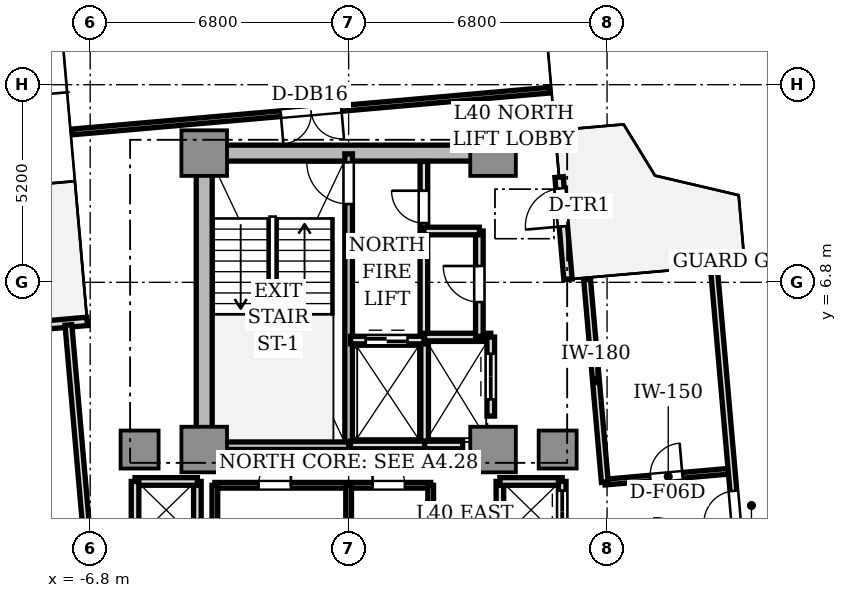
"""IFC4 building model, lengths in metres.
Left out: names, types, materials, properties, quantities, classifications, styles, units other than length and angle.
Written with IfcOpenShell. Run it as: python <this file> out.ifc"""

import sys

from ifc_helpers import new_model, si_unit, direction, frame, frame_2d, origin, origin_2d, place, context, subcontext, project, spatial, rectangle, extrude, source, transform, mapped, element, fill, save


model = new_model("IFC4")
c1 = context("Model", 3, precision=1e-05, world=origin(), true_north=direction((0.0, 1.0)))
c2 = subcontext(c1, "Body", "Model", "MODEL_VIEW")
j1 = project(units=[si_unit("LENGTHUNIT", "METRE"), si_unit("PLANEANGLEUNIT", "RADIAN")], contexts=[c1])
p1 = place(None, origin())
s1 = spatial("IfcSite", under=j1, at=p1, CompositionType="ELEMENT")
p2 = place(p1, origin())
s2 = spatial("IfcBuilding", under=s1, at=p2, CompositionType="ELEMENT")
p3 = place(p2, frame((0.0, 0.0, 147.25)))
s3 = spatial("IfcBuildingStorey", under=s2, at=p3, CompositionType="ELEMENT", Elevation=147.25)
p4 = place(p3, frame((-3.55, 10.2, 0.0), z_axis=(0.0, 0.0, 1.0), x_axis=(1.0, 0.0, 0.0)))
e1 = element("IfcWall", 1, at=p4, inside=s3, PredefinedType="SHEAR", context=c2, shape_type="SweptSolid", body=[
    extrude(rectangle(XDim=7.1, YDim=0.42, at=frame_2d((3.55, 0.0))), origin(), (0.0, 0.0, 1.0), 3.11),
])
p5 = place(p3, frame((-3.8, 2.85, 0.0), z_axis=(0.0, 0.0, 1.0), x_axis=(0.0, 1.0, 0.0)))
e2 = element("IfcWall", 2, at=p5, inside=s3, PredefinedType="SHEAR", context=c2, shape_type="SweptSolid", body=[
    extrude(rectangle(XDim=6.9, YDim=0.42, at=frame_2d((3.45, 0.0))), origin(), (0.0, 0.0, 1.0), 3.11),
])
m1 = source(origin(), c2, "Body", "SweptSolid", [
    extrude(rectangle(XDim=1.2, YDim=1.2, at=origin_2d()), origin(), (0.0, 0.0, 1.0), 3.11),
])
for number, where, z_axis, x_axis in (
    (3, (-3.8, 2.4, 0.0), (0.0, 0.0, 1.0), (1.0, 0.0, 0.0)),
    (4, (3.8, 2.4, 0.0), (0.0, 0.0, 1.0), (1.0, 0.0, 0.0)),
    (5, (-3.8, 10.2, 0.0), (0.0, 0.0, 1.0), (1.0, 0.0, 0.0)),
    (6, (3.8, 10.2, 0.0), (0.0, 0.0, 1.0), (1.0, 0.0, 0.0)),
):
    element("IfcColumn", number, at=place(p3, frame(where, z_axis=z_axis, x_axis=x_axis)), inside=s3, PredefinedType="COLUMN", context=c2, shape_type="MappedRepresentation", body=[
        mapped(m1, transform((0.0, 0.0, 0.0), scale=1.0)),
    ])
m2 = source(origin(), c2, "Body", "SweptSolid", [
    extrude(rectangle(XDim=1.0, YDim=1.0, at=origin_2d()), origin(), (0.0, 0.0, 1.0), 3.11),
])
for number, where, z_axis, x_axis in (
    (7, (5.5, 2.4, 0.0), (0.0, 0.0, 1.0), (1.0, 0.0, 0.0)),
    (8, (-5.5, 2.4, 0.0), (0.0, 0.0, 1.0), (1.0, 0.0, 0.0)),
):
    element("IfcColumn", number, at=place(p3, frame(where, z_axis=z_axis, x_axis=x_axis)), inside=s3, PredefinedType="COLUMN", context=c2, shape_type="MappedRepresentation", body=[
        mapped(m2, transform((0.0, 0.0, 0.0), scale=1.0)),
    ])
p6 = place(p3, frame((5.772, 6.879, 0.0), z_axis=(0.0, 0.0, 1.0), x_axis=(-0.087168071984, 0.996193619346, 0.0)))
e9 = element("IfcWall", 9, at=p6, inside=s3, PredefinedType="STANDARD", context=c2, shape_type="SweptSolid", body=[
    extrude(rectangle(XDim=2.7, YDim=0.22, at=frame_2d((1.35, 0.0))), origin(), (0.0, 0.0, 1.0), 3.11),
])
p7 = place(p6, frame((1.4, 0.0, 0.0)))
e10 = element("IfcOpeningElement", 10, at=p7, cuts=e9, PredefinedType="OPENING", context=c2, shape_type="SweptSolid", body=[
    extrude(rectangle(XDim=1.0, YDim=2.2, at=frame_2d((0.5, 1.1))), frame((0.0, 0.12, 0.0), z_axis=(0.0, -1.0, 0.0), x_axis=(1.0, 0.0, 0.0)), (0.0, 0.0, 1.0), 0.24),
])
p8 = place(p3, frame((-6.879, 5.772, 0.0), z_axis=(0.0, 0.0, 1.0), x_axis=(-0.996193619346, -0.087168071984, 0.0)))
e11 = element("IfcWall", 11, at=p8, inside=s3, PredefinedType="STANDARD", context=c2, shape_type="SweptSolid", body=[
    extrude(rectangle(XDim=2.7, YDim=0.22, at=frame_2d((1.35, 0.0))), origin(), (0.0, 0.0, 1.0), 3.11),
])
p9 = place(p8, frame((1.4, 0.0, 0.0)))
e12 = element("IfcOpeningElement", 12, at=p9, cuts=e11, PredefinedType="OPENING", context=c2, shape_type="SweptSolid", body=[
    extrude(rectangle(XDim=1.0, YDim=2.2, at=frame_2d((0.5, 1.1))), frame((0.0, 0.12, 0.0), z_axis=(0.0, -1.0, 0.0), x_axis=(1.0, 0.0, 0.0)), (0.0, 0.0, 1.0), 0.24),
])
p10 = place(p3, frame((0.0, 2.5, 0.0), z_axis=(0.0, 0.0, 1.0), x_axis=(0.0, 1.0, 0.0)))
e13 = element("IfcWall", 13, at=p10, inside=s3, PredefinedType="SOLIDWALL", context=c2, shape_type="SweptSolid", body=[
    extrude(rectangle(XDim=7.68, YDim=0.2, at=frame_2d((3.84, 0.0))), origin(), (0.0, 0.0, 1.0), 3.11),
])
p11 = place(p10, frame((6.36, 0.0, 0.0)))
e14 = element("IfcOpeningElement", 14, at=p11, cuts=e13, PredefinedType="OPENING", context=c2, shape_type="SweptSolid", body=[
    extrude(rectangle(XDim=1.1, YDim=2.15, at=frame_2d((0.55, 1.075))), frame((0.0, 0.11, 0.0), z_axis=(0.0, -1.0, 0.0), x_axis=(1.0, 0.0, 0.0)), (0.0, 0.0, 1.0), 0.22),
])
p12 = place(p3, frame((-3.72, 2.5, 0.0), z_axis=(0.0, 0.0, 1.0), x_axis=(1.0, 0.0, 0.0)))
e15 = element("IfcWall", 15, at=p12, inside=s3, PredefinedType="SOLIDWALL", context=c2, shape_type="SweptSolid", body=[
    extrude(rectangle(XDim=3.72, YDim=0.2, at=frame_2d((1.86, 0.0))), origin(), (0.0, 0.0, 1.0), 3.11),
])
p13 = place(p3, frame((1.98, 5.32, 0.0), z_axis=(0.0, 0.0, 1.0), x_axis=(0.0, 1.0, 0.0)))
e16 = element("IfcWall", 16, at=p13, inside=s3, PredefinedType="SOLIDWALL", context=c2, shape_type="SweptSolid", body=[
    extrude(rectangle(XDim=4.66, YDim=0.2, at=frame_2d((2.33, 0.0))), origin(), (0.0, 0.0, 1.0), 2.66),
])
p14 = place(p13, frame((3.04, 0.0, 0.0)))
e17 = element("IfcOpeningElement", 17, at=p14, cuts=e16, PredefinedType="OPENING", context=c2, shape_type="SweptSolid", body=[
    extrude(rectangle(XDim=0.85, YDim=2.1, at=frame_2d((0.425, 1.05))), frame((0.0, 0.11, 0.0), z_axis=(0.0, -1.0, 0.0), x_axis=(1.0, 0.0, 0.0)), (0.0, 0.0, 1.0), 0.22),
])
p15 = place(p3, frame((2.0, 2.5, 0.0), z_axis=(0.0, 0.0, 1.0), x_axis=(0.0, 1.0, 0.0)))
e18 = element("IfcWall", 18, at=p15, inside=s3, PredefinedType="SOLIDWALL", context=c2, shape_type="SweptSolid", body=[
    extrude(rectangle(XDim=2.78, YDim=0.2, at=frame_2d((1.39, 0.0))), origin(), (0.0, 0.0, 1.0), 2.66),
])
p16 = place(p3, frame((0.05, 2.52, 0.0), z_axis=(0.0, 0.0, 1.0), x_axis=(1.0, 0.0, 0.0)))
e19 = element("IfcWall", 19, at=p16, inside=s3, PredefinedType="SOLIDWALL", context=c2, shape_type="SweptSolid", body=[
    extrude(rectangle(XDim=1.95, YDim=0.2, at=frame_2d((0.975, 0.0))), origin(), (0.0, 0.0, 1.0), 2.66),
])
p17 = place(p3, frame((0.05, 5.28, 0.0), z_axis=(0.0, 0.0, 1.0), x_axis=(1.0, 0.0, 0.0)))
e20 = element("IfcWall", 20, at=p17, inside=s3, PredefinedType="SOLIDWALL", context=c2, shape_type="SweptSolid", body=[
    extrude(rectangle(XDim=1.93, YDim=0.2, at=frame_2d((0.965, 0.0))), origin(), (0.0, 0.0, 1.0), 2.66),
])
p18 = place(p17, frame((0.4, 0.0, 0.0)))
e21 = element("IfcOpeningElement", 21, at=p18, cuts=e20, PredefinedType="OPENING", context=c2, shape_type="SweptSolid", body=[
    extrude(rectangle(XDim=1.1, YDim=2.2, at=frame_2d((0.55, 1.1))), frame((0.0, 0.11, 0.0), z_axis=(0.0, -1.0, 0.0), x_axis=(1.0, 0.0, 0.0)), (0.0, 0.0, 1.0), 0.22),
])
p19 = place(p3, frame((2.0, 2.52, 0.0), z_axis=(0.0, 0.0, 1.0), x_axis=(1.0, 0.0, 0.0)))
e22 = element("IfcWall", 22, at=p19, inside=s3, PredefinedType="SOLIDWALL", context=c2, shape_type="SweptSolid", body=[
    extrude(rectangle(XDim=1.0, YDim=0.2, at=frame_2d((0.5, 0.0))), origin(), (0.0, 0.0, 1.0), 2.66),
])
p20 = place(p3, frame((2.0, 5.36, 0.0), z_axis=(0.0, 0.0, 1.0), x_axis=(1.0, 0.0, 0.0)))
e23 = element("IfcWall", 23, at=p20, inside=s3, PredefinedType="SOLIDWALL", context=c2, shape_type="SweptSolid", body=[
    extrude(rectangle(XDim=1.74, YDim=0.2, at=frame_2d((0.87, 0.0))), origin(), (0.0, 0.0, 1.0), 2.66),
])
p21 = place(p3, frame((3.74, 3.28, 0.0), z_axis=(0.0, 0.0, 1.0), x_axis=(0.0, 1.0, 0.0)))
e24 = element("IfcWall", 24, at=p21, inside=s3, PredefinedType="SOLIDWALL", context=c2, shape_type="SweptSolid", body=[
    extrude(rectangle(XDim=2.08, YDim=0.2, at=frame_2d((1.04, 0.0))), origin(), (0.0, 0.0, 1.0), 2.66),
])
p22 = place(p21, frame((0.44, 0.0, 0.0)))
e25 = element("IfcOpeningElement", 25, at=p22, cuts=e24, PredefinedType="OPENING", context=c2, shape_type="SweptSolid", body=[
    extrude(rectangle(XDim=1.2, YDim=2.2, at=frame_2d((0.6, 1.1))), frame((0.0, 0.11, 0.0), z_axis=(0.0, -1.0, 0.0), x_axis=(1.0, 0.0, 0.0)), (0.0, 0.0, 1.0), 0.22),
])
p23 = place(p3, frame((3.98, -1.56, 0.0), z_axis=(0.0, 0.0, 1.0), x_axis=(0.0, 1.0, 0.0)))
e26 = element("IfcWall", 26, at=p23, inside=s3, PredefinedType="SOLIDWALL", context=c2, shape_type="SweptSolid", body=[
    extrude(rectangle(XDim=3.12, YDim=0.2, at=frame_2d((1.56, 0.0))), origin(), (0.0, 0.0, 1.0), 2.28),
])
p24 = place(p3, frame((3.98, 1.56, 0.0), z_axis=(0.0, 0.0, 1.0), x_axis=(1.0, 0.0, 0.0)))
e27 = element("IfcWall", 27, at=p24, inside=s3, PredefinedType="SOLIDWALL", context=c2, shape_type="SweptSolid", body=[
    extrude(rectangle(XDim=1.64, YDim=0.2, at=frame_2d((0.82, 0.0))), origin(), (0.0, 0.0, 1.0), 2.66),
])
p25 = place(p3, frame((5.62, 0.0, 0.0), z_axis=(0.0, 0.0, 1.0), x_axis=(0.0, 1.0, 0.0)))
e28 = element("IfcWall", 28, at=p25, inside=s3, PredefinedType="SOLIDWALL", context=c2, shape_type="SweptSolid", body=[
    extrude(rectangle(XDim=1.56, YDim=0.2, at=frame_2d((0.78, 0.0))), origin(), (0.0, 0.0, 1.0), 2.66),
])
p26 = place(p25, frame((0.22, 0.0, 0.0)))
e29 = element("IfcOpeningElement", 29, at=p26, cuts=e28, PredefinedType="OPENING", context=c2, shape_type="SweptSolid", body=[
    extrude(rectangle(XDim=1.1, YDim=2.2, at=frame_2d((0.55, 1.1))), frame((0.0, 0.11, 0.0), z_axis=(0.0, -1.0, 0.0), x_axis=(1.0, 0.0, 0.0)), (0.0, 0.0, 1.0), 0.22),
])
p27 = place(p3, frame((-3.98, -1.56, 0.0), z_axis=(0.0, 0.0, 1.0), x_axis=(0.0, 1.0, 0.0)))
e30 = element("IfcWall", 30, at=p27, inside=s3, PredefinedType="SOLIDWALL", context=c2, shape_type="SweptSolid", body=[
    extrude(rectangle(XDim=3.12, YDim=0.2, at=frame_2d((1.56, 0.0))), origin(), (0.0, 0.0, 1.0), 2.28),
])
p28 = place(p3, frame((-5.62, 1.56, 0.0), z_axis=(0.0, 0.0, 1.0), x_axis=(1.0, 0.0, 0.0)))
e31 = element("IfcWall", 31, at=p28, inside=s3, PredefinedType="SOLIDWALL", context=c2, shape_type="SweptSolid", body=[
    extrude(rectangle(XDim=1.64, YDim=0.2, at=frame_2d((0.82, 0.0))), origin(), (0.0, 0.0, 1.0), 2.66),
])
p29 = place(p3, frame((-5.62, 0.0, 0.0), z_axis=(0.0, 0.0, 1.0), x_axis=(0.0, 1.0, 0.0)))
e32 = element("IfcWall", 32, at=p29, inside=s3, PredefinedType="SOLIDWALL", context=c2, shape_type="SweptSolid", body=[
    extrude(rectangle(XDim=1.56, YDim=0.2, at=frame_2d((0.78, 0.0))), origin(), (0.0, 0.0, 1.0), 2.66),
])
p30 = place(p3, frame((3.44, 5.38, 0.0), z_axis=(0.0, 0.0, 1.0), x_axis=(0.0, 1.0, 0.0)))
e33 = element("IfcWall", 33, at=p30, inside=s3, PredefinedType="SOLIDWALL", context=c2, shape_type="SweptSolid", body=[
    extrude(rectangle(XDim=2.77, YDim=0.2, at=frame_2d((1.385, 0.0))), origin(), (0.0, 0.0, 1.0), 2.66),
])
p31 = place(p30, frame((0.9, 0.0, 0.0)))
e34 = element("IfcOpeningElement", 34, at=p31, cuts=e33, PredefinedType="OPENING", context=c2, shape_type="SweptSolid", body=[
    extrude(rectangle(XDim=0.95, YDim=2.15, at=frame_2d((0.475, 1.075))), frame((0.0, 0.11, 0.0), z_axis=(0.0, -1.0, 0.0), x_axis=(1.0, 0.0, 0.0)), (0.0, 0.0, 1.0), 0.22),
])
p32 = place(p3, frame((1.98, 8.15, 0.0), z_axis=(0.0, 0.0, 1.0), x_axis=(1.0, 0.0, 0.0)))
e35 = element("IfcWall", 35, at=p32, inside=s3, PredefinedType="SOLIDWALL", context=c2, shape_type="SweptSolid", body=[
    extrude(rectangle(XDim=1.46, YDim=0.2, at=frame_2d((0.73, 0.0))), origin(), (0.0, 0.0, 1.0), 2.66),
])
p33 = place(p3, frame((-3.52, 1.46, 0.0), z_axis=(0.0, 0.0, 1.0), x_axis=(1.0, 0.0, 0.0)))
e36 = element("IfcWall", 36, at=p33, inside=s3, PredefinedType="PARTITIONING", context=c2, shape_type="SweptSolid", body=[
    extrude(rectangle(XDim=5.68, YDim=0.15, at=frame_2d((2.84, 0.0))), origin(), (0.0, 0.0, 1.0), 2.66),
])
p34 = place(p33, frame((1.15, 0.0, 0.0)))
e37 = element("IfcOpeningElement", 37, at=p34, cuts=e36, PredefinedType="OPENING", context=c2, shape_type="SweptSolid", body=[
    extrude(rectangle(XDim=0.85, YDim=2.1, at=frame_2d((0.425, 1.05))), frame((0.0, 0.085, 0.0), z_axis=(0.0, -1.0, 0.0), x_axis=(1.0, 0.0, 0.0)), (0.0, 0.0, 1.0), 0.17),
])
p35 = place(p33, frame((4.15, 0.0, 0.0)))
e38 = element("IfcOpeningElement", 38, at=p35, cuts=e36, PredefinedType="OPENING", context=c2, shape_type="SweptSolid", body=[
    extrude(rectangle(XDim=0.85, YDim=2.1, at=frame_2d((0.425, 1.05))), frame((0.0, 0.085, 0.0), z_axis=(0.0, -1.0, 0.0), x_axis=(1.0, 0.0, 0.0)), (0.0, 0.0, 1.0), 0.17),
])
p36 = place(p3, frame((-3.52, 0.1, 0.0), z_axis=(0.0, 0.0, 1.0), x_axis=(0.0, 1.0, 0.0)))
e39 = element("IfcWall", 39, at=p36, inside=s3, PredefinedType="PARTITIONING", context=c2, shape_type="SweptSolid", body=[
    extrude(rectangle(XDim=1.36, YDim=0.15, at=frame_2d((0.68, 0.0))), origin(), (0.0, 0.0, 1.0), 2.28),
])
for number, where, z_axis, x_axis in (
    (40, (2.16, 0.1, 0.0), (0.0, 0.0, 1.0), (0.0, 1.0, 0.0)),
    (41, (0.0, 0.1, 0.0), (0.0, 0.0, 1.0), (0.0, 1.0, 0.0)),
):
    element("IfcWall", number, at=place(p3, frame(where, z_axis=z_axis, x_axis=x_axis)), inside=s3, PredefinedType="PARTITIONING", context=c2, shape_type="SweptSolid", body=[
        extrude(rectangle(XDim=1.36, YDim=0.15, at=frame_2d((0.68, 0.0))), origin(), (0.0, 0.0, 1.0), 2.66),
    ])
p37 = place(p3, frame((6.741, 1.543, 0.0), z_axis=(0.0, 0.0, 1.0), x_axis=(0.996193954812, 0.087164238054, 0.0)))
e42 = element("IfcWall", 42, at=p37, inside=s3, PredefinedType="PARTITIONING", context=c2, shape_type="SweptSolid", body=[
    extrude(rectangle(XDim=3.35, YDim=0.15, at=frame_2d((1.675, 0.0))), origin(), (0.0, 0.0, 1.0), 2.66),
])
p38 = place(p37, frame((1.2, 0.0, 0.0)))
e43 = element("IfcOpeningElement", 43, at=p38, cuts=e42, PredefinedType="OPENING", context=c2, shape_type="SweptSolid", body=[
    extrude(rectangle(XDim=0.85, YDim=2.1, at=frame_2d((0.425, 1.05))), frame((0.0, 0.085, 0.0), z_axis=(0.0, -1.0, 0.0), x_axis=(1.0, 0.0, 0.0)), (0.0, 0.0, 1.0), 0.17),
])
p39 = place(p3, frame((6.741, 1.543, 0.0), z_axis=(0.0, 0.0, 1.0), x_axis=(-0.087161289348, 0.996194212812, 0.0)))
e44 = element("IfcWall", 44, at=p39, inside=s3, PredefinedType="PARTITIONING", context=c2, shape_type="SweptSolid", body=[
    extrude(rectangle(XDim=5.35, YDim=0.18, at=frame_2d((2.675, 0.0))), origin(), (0.0, 0.0, 1.0), 2.66),
])
p40 = place(p3, frame((10.71, -5.387, 0.0), z_axis=(0.0, 0.0, 1.0), x_axis=(-0.087154691724, 0.996194790044, 0.0)))
e45 = element("IfcWall", 45, at=p40, inside=s3, PredefinedType="PARTITIONING", context=c2, shape_type="SweptSolid", body=[
    extrude(rectangle(XDim=12.6, YDim=0.18, at=frame_2d((6.3, 0.0))), origin(), (0.0, 0.0, 1.0), 2.66),
])
p41 = place(p40, frame((5.875, 0.0, 0.0)))
e46 = element("IfcOpeningElement", 46, at=p41, cuts=e45, PredefinedType="OPENING", context=c2, shape_type="SweptSolid", body=[
    extrude(rectangle(XDim=0.85, YDim=2.1, at=frame_2d((0.425, 1.05))), frame((0.0, 0.1, 0.0), z_axis=(0.0, -1.0, 0.0), x_axis=(1.0, 0.0, 0.0)), (0.0, 0.0, 1.0), 0.2),
])
p42 = place(p3, frame((5.287, 11.856, 0.0), z_axis=(0.0, 0.0, 1.0), x_axis=(-0.996194790044, -0.087154691724, 0.0)))
e47 = element("IfcWall", 47, at=p42, inside=s3, PredefinedType="PARTITIONING", context=c2, shape_type="SweptSolid", body=[
    extrude(rectangle(XDim=12.6, YDim=0.15, at=frame_2d((6.3, 0.0))), origin(), (0.0, 0.0, 1.0), 2.66),
])
p43 = place(p42, frame((5.5, 0.0, 0.0)))
e48 = element("IfcOpeningElement", 48, at=p43, cuts=e47, PredefinedType="OPENING", context=c2, shape_type="SweptSolid", body=[
    extrude(rectangle(XDim=1.6, YDim=2.25, at=frame_2d((0.8, 1.125))), frame((0.0, 0.085, 0.0), z_axis=(0.0, -1.0, 0.0), x_axis=(1.0, 0.0, 0.0)), (0.0, 0.0, 1.0), 0.17),
])
p44 = place(p3, frame((-7.373, 5.679, 0.0), z_axis=(0.0, 0.0, 1.0), x_axis=(0.087163455754, -0.996194023261, 0.0)))
e49 = element("IfcWall", 49, at=p44, inside=s3, PredefinedType="PARTITIONING", context=c2, shape_type="SweptSolid", body=[
    extrude(rectangle(XDim=10.4, YDim=0.18, at=frame_2d((5.2, 0.0))), origin(), (0.0, 0.0, 1.0), 2.66),
])
m3 = source(origin(), c2, "Body", "SweptSolid", [
    extrude(rectangle(XDim=1.0, YDim=0.05, at=origin_2d()), origin(), (0.0, 0.0, 1.0), 2.2),
])
p45 = place(p7, frame((0.5, 0.0, 0.0)))
e50 = element("IfcDoor", 50, at=p45, inside=s3, OperationType="SINGLE_SWING_LEFT", PredefinedType="DOOR", context=c2, shape_type="MappedRepresentation", body=[
    mapped(m3, transform((0.0, 0.0, 0.0), scale=1.0)),
])
fill(e10, e50)
m4 = source(origin(), c2, "Body", "SweptSolid", [
    extrude(rectangle(XDim=1.1, YDim=0.05, at=origin_2d()), origin(), (0.0, 0.0, 1.0), 2.15),
])
p46 = place(p11, frame((0.55, 0.0, 0.0)))
e51 = element("IfcDoor", 51, at=p46, inside=s3, OperationType="SINGLE_SWING_RIGHT", PredefinedType="DOOR", context=c2, shape_type="MappedRepresentation", body=[
    mapped(m4, transform((0.0, 0.0, 0.0), scale=1.0)),
])
fill(e14, e51)
m5 = source(origin(), c2, "Body", "SweptSolid", [
    extrude(rectangle(XDim=0.85, YDim=0.05, at=origin_2d()), origin(), (0.0, 0.0, 1.0), 2.1),
])
p47 = place(p14, frame((0.425, 0.0, 0.0)))
e52 = element("IfcDoor", 52, at=p47, inside=s3, OperationType="SINGLE_SWING_RIGHT", PredefinedType="DOOR", context=c2, shape_type="MappedRepresentation", body=[
    mapped(m5, transform((0.0, 0.0, 0.0), scale=1.0)),
])
fill(e17, e52)
m6 = source(origin(), c2, "Body", "SweptSolid", [
    extrude(rectangle(XDim=1.1, YDim=0.05, at=origin_2d()), origin(), (0.0, 0.0, 1.0), 2.2),
])
p48 = place(p18, frame((0.55, 0.0, 0.0)))
e53 = element("IfcDoor", 53, at=p48, inside=s3, OperationType="DOUBLE_DOOR_SLIDING", PredefinedType="DOOR", context=c2, shape_type="MappedRepresentation", body=[
    mapped(m6, transform((0.0, 0.0, 0.0), scale=1.0)),
])
fill(e21, e53)
m7 = source(origin(), c2, "Body", "SweptSolid", [
    extrude(rectangle(XDim=1.2, YDim=0.05, at=origin_2d()), origin(), (0.0, 0.0, 1.0), 2.2),
])
p49 = place(p22, frame((0.6, 0.0, 0.0)))
e54 = element("IfcDoor", 54, at=p49, inside=s3, OperationType="DOUBLE_DOOR_SLIDING", PredefinedType="DOOR", context=c2, shape_type="MappedRepresentation", body=[
    mapped(m7, transform((0.0, 0.0, 0.0), scale=1.0)),
])
fill(e25, e54)
p50 = place(p26, frame((0.55, 0.0, 0.0)))
e55 = element("IfcDoor", 55, at=p50, inside=s3, OperationType="DOUBLE_DOOR_SLIDING", PredefinedType="DOOR", context=c2, shape_type="MappedRepresentation", body=[
    mapped(m6, transform((0.0, 0.0, 0.0), scale=1.0)),
])
fill(e29, e55)
m8 = source(origin(), c2, "Body", "SweptSolid", [
    extrude(rectangle(XDim=0.95, YDim=0.05, at=origin_2d()), origin(), (0.0, 0.0, 1.0), 2.15),
])
p51 = place(p31, frame((0.475, 0.0, 0.0)))
e56 = element("IfcDoor", 56, at=p51, inside=s3, OperationType="SINGLE_SWING_RIGHT", PredefinedType="DOOR", context=c2, shape_type="MappedRepresentation", body=[
    mapped(m8, transform((0.0, 0.0, 0.0), scale=1.0)),
])
fill(e34, e56)
p52 = place(p34, frame((0.425, 0.0, 0.0)))
e57 = element("IfcDoor", 57, at=p52, inside=s3, OperationType="SINGLE_SWING_RIGHT", PredefinedType="DOOR", context=c2, shape_type="MappedRepresentation", body=[
    mapped(m5, transform((0.0, 0.0, 0.0), scale=1.0)),
])
fill(e37, e57)
p53 = place(p35, frame((0.425, 0.0, 0.0)))
e58 = element("IfcDoor", 58, at=p53, inside=s3, OperationType="SINGLE_SWING_LEFT", PredefinedType="DOOR", context=c2, shape_type="MappedRepresentation", body=[
    mapped(m5, transform((0.0, 0.0, 0.0), scale=1.0)),
])
fill(e38, e58)
p54 = place(p38, frame((0.425, 0.0, 0.0)))
e59 = element("IfcDoor", 59, at=p54, inside=s3, OperationType="SINGLE_SWING_RIGHT", PredefinedType="DOOR", context=c2, shape_type="MappedRepresentation", body=[
    mapped(m5, transform((0.0, 0.0, 0.0), scale=1.0)),
])
fill(e43, e59)
p55 = place(p41, frame((0.425, 0.0, 0.0)))
e60 = element("IfcDoor", 60, at=p55, inside=s3, OperationType="SINGLE_SWING_LEFT", PredefinedType="DOOR", context=c2, shape_type="MappedRepresentation", body=[
    mapped(m5, transform((0.0, 0.0, 0.0), scale=1.0)),
])
fill(e46, e60)
m9 = source(origin(), c2, "Body", "SweptSolid", [
    extrude(rectangle(XDim=1.6, YDim=0.05, at=origin_2d()), origin(), (0.0, 0.0, 1.0), 2.25),
])
p56 = place(p43, frame((0.8, 0.0, 0.0)))
e61 = element("IfcDoor", 61, at=p56, inside=s3, OperationType="DOUBLE_DOOR_SINGLE_SWING", PredefinedType="DOOR", context=c2, shape_type="MappedRepresentation", body=[
    mapped(m9, transform((0.0, 0.0, 0.0), scale=1.0)),
])
fill(e48, e61)
save(model, sys.argv[1])
